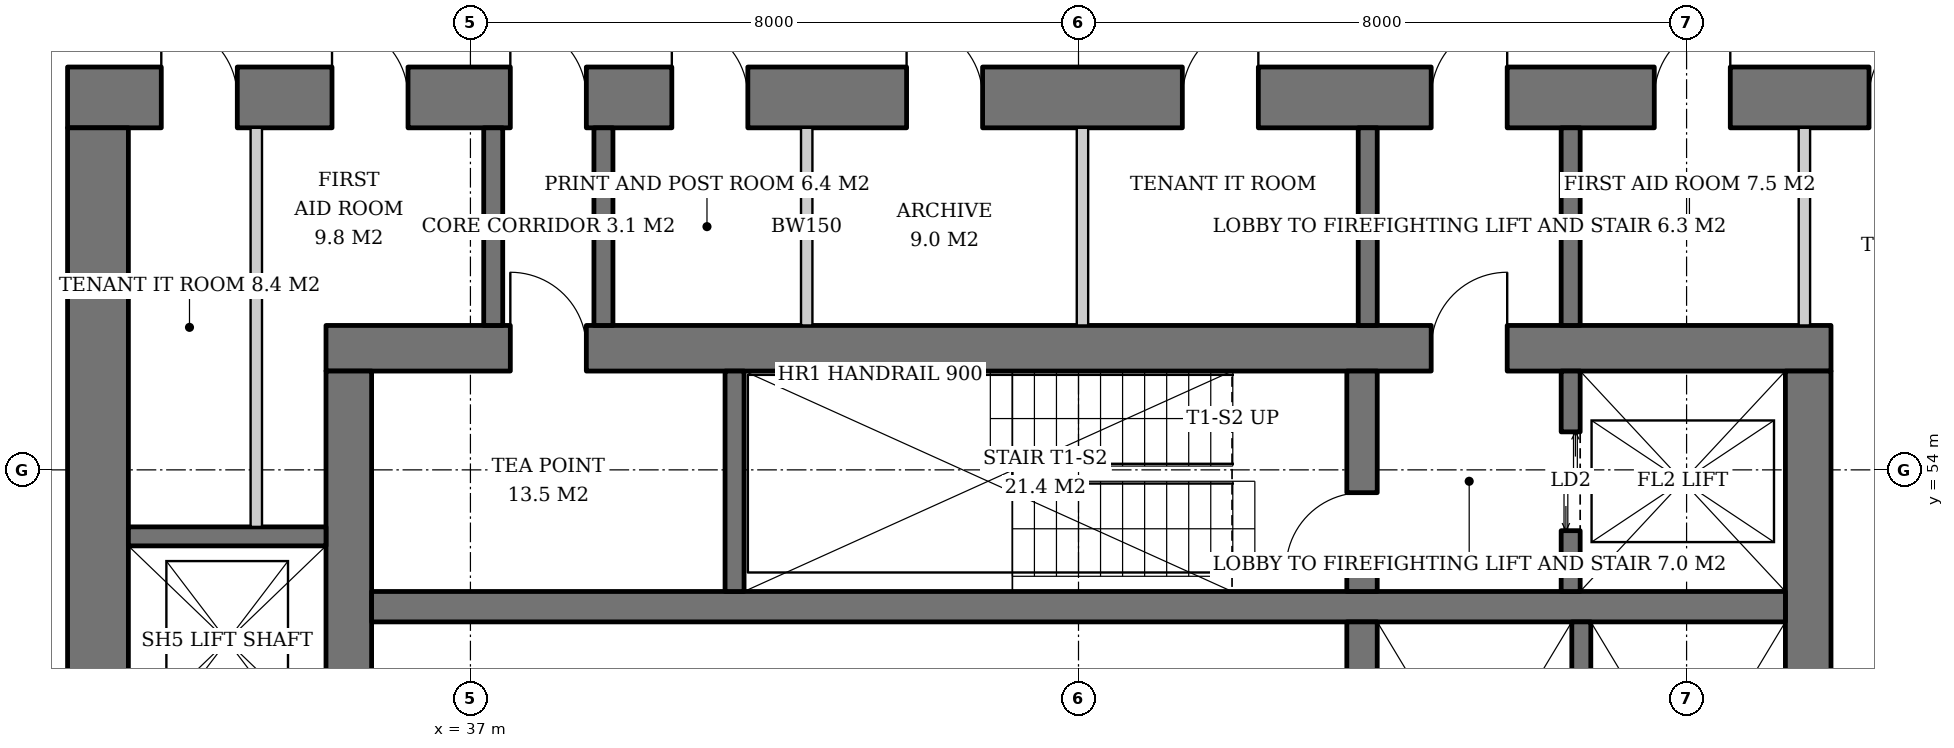
"""IFC4 building model, lengths in metres.
Left out: names, types, materials, properties, quantities, classifications, styles, units other than length and angle.
Written with IfcOpenShell. Run it as: python <this file> out.ifc"""

import sys

from ifc_helpers import new_model, si_unit, direction, frame, frame_2d, origin, place, context, subcontext, project, spatial, rectangle, extrude, element, fill, save


model = new_model("IFC4")
c1 = context("Model", 3, precision=1e-05, world=origin(), true_north=direction((0.0, 1.0)))
c2 = subcontext(c1, "Body", "Model", "MODEL_VIEW")
j1 = project(units=[si_unit("LENGTHUNIT", "METRE"), si_unit("PLANEANGLEUNIT", "RADIAN")], contexts=[c1])
p1 = place(None, origin())
s1 = spatial("IfcSite", under=j1, at=p1, CompositionType="ELEMENT")
p2 = place(p1, origin())
s2 = spatial("IfcBuilding", under=s1, at=p2, CompositionType="ELEMENT")
p3 = place(p2, frame((0.0, 0.0, 66.6)))
s3 = spatial("IfcBuildingStorey", under=s2, at=p3, CompositionType="ELEMENT", Elevation=66.6)
p4 = place(p3, frame((35.1, 55.6, 0.0), z_axis=(0.0, 0.0, 1.0), x_axis=(1.0, 0.0, 0.0)))
e1 = element("IfcWall", 1, at=p4, inside=s3, PredefinedType="SHEAR", context=c2, shape_type="SweptSolid", body=[
    extrude(rectangle(XDim=19.8, YDim=0.6, at=frame_2d((9.9, 0.0))), origin(), (0.0, 0.0, 1.0), 3.8),
])
p5 = place(p4, frame((14.54, 0.0, 0.0)))
e2 = element("IfcOpeningElement", 2, at=p5, cuts=e1, PredefinedType="OPENING", context=c2, shape_type="SweptSolid", body=[
    extrude(rectangle(XDim=1.0, YDim=2.1, at=frame_2d((0.5, 1.05))), frame((0.0, 0.31, 0.0), z_axis=(0.0, -1.0, 0.0), x_axis=(1.0, 0.0, 0.0)), (0.0, 0.0, 1.0), 0.62),
])
p6 = place(p4, frame((2.425, 0.0, 0.0)))
e3 = element("IfcOpeningElement", 3, at=p6, cuts=e1, PredefinedType="OPENING", context=c2, shape_type="SweptSolid", body=[
    extrude(rectangle(XDim=1.0, YDim=2.1, at=frame_2d((0.5, 1.05))), frame((0.0, 0.31, 0.0), z_axis=(0.0, -1.0, 0.0), x_axis=(1.0, 0.0, 0.0)), (0.0, 0.0, 1.0), 0.62),
])
p7 = place(p3, frame((35.4, 36.7, 0.0), z_axis=(0.0, 0.0, 1.0), x_axis=(0.0, 1.0, 0.0)))
e4 = element("IfcWall", 4, at=p7, inside=s3, PredefinedType="SHEAR", context=c2, shape_type="SweptSolid", body=[
    extrude(rectangle(XDim=18.6, YDim=0.6, at=frame_2d((9.3, 0.0))), origin(), (0.0, 0.0, 1.0), 3.8),
])
p8 = place(p7, frame((8.4, 0.0, 0.0)))
e5 = element("IfcOpeningElement", 5, at=p8, cuts=e4, PredefinedType="OPENING", context=c2, shape_type="SweptSolid", body=[
    extrude(rectangle(XDim=1.8, YDim=2.4, at=frame_2d((0.9, 1.2))), frame((0.0, 0.31, 0.0), z_axis=(0.0, -1.0, 0.0), x_axis=(1.0, 0.0, 0.0)), (0.0, 0.0, 1.0), 0.62),
])
p9 = place(p3, frame((54.6, 36.7, 0.0), z_axis=(0.0, 0.0, 1.0), x_axis=(0.0, 1.0, 0.0)))
e6 = element("IfcWall", 6, at=p9, inside=s3, PredefinedType="SHEAR", context=c2, shape_type="SweptSolid", body=[
    extrude(rectangle(XDim=18.6, YDim=0.6, at=frame_2d((9.3, 0.0))), origin(), (0.0, 0.0, 1.0), 3.8),
])
p10 = place(p9, frame((8.4, 0.0, 0.0)))
e7 = element("IfcOpeningElement", 7, at=p10, cuts=e6, PredefinedType="OPENING", context=c2, shape_type="SweptSolid", body=[
    extrude(rectangle(XDim=1.8, YDim=2.4, at=frame_2d((0.9, 1.2))), frame((0.0, 0.31, 0.0), z_axis=(0.0, -1.0, 0.0), x_axis=(1.0, 0.0, 0.0)), (0.0, 0.0, 1.0), 0.62),
])
p11 = place(p3, frame((31.7, 58.9, 0.0), z_axis=(0.0, 0.0, 1.0), x_axis=(1.0, 0.0, 0.0)))
e8 = element("IfcWall", 8, at=p11, inside=s3, PredefinedType="SHEAR", context=c2, shape_type="SweptSolid", body=[
    extrude(rectangle(XDim=26.6, YDim=0.8, at=frame_2d((13.3, 0.0))), origin(), (0.0, 0.0, 1.0), 3.8),
])
p12 = place(p11, frame((17.94, 0.0, 0.0)))
e9 = element("IfcOpeningElement", 9, at=p12, cuts=e8, PredefinedType="OPENING", context=c2, shape_type="SweptSolid", body=[
    extrude(rectangle(XDim=1.0, YDim=2.1, at=frame_2d((0.5, 1.05))), frame((0.0, 0.41, 0.0), z_axis=(0.0, -1.0, 0.0), x_axis=(1.0, 0.0, 0.0)), (0.0, 0.0, 1.0), 0.82),
])
p13 = place(p11, frame((5.825, 0.0, 0.0)))
e10 = element("IfcOpeningElement", 10, at=p13, cuts=e8, PredefinedType="OPENING", context=c2, shape_type="SweptSolid", body=[
    extrude(rectangle(XDim=1.0, YDim=2.1, at=frame_2d((0.5, 1.05))), frame((0.0, 0.41, 0.0), z_axis=(0.0, -1.0, 0.0), x_axis=(1.0, 0.0, 0.0)), (0.0, 0.0, 1.0), 0.82),
])
p14 = place(p11, frame((1.233, 0.0, 0.0)))
e11 = element("IfcOpeningElement", 11, at=p14, cuts=e8, PredefinedType="OPENING", context=c2, shape_type="SweptSolid", body=[
    extrude(rectangle(XDim=1.0, YDim=2.1, at=frame_2d((0.5, 1.05))), frame((0.0, 0.41, 0.0), z_axis=(0.0, -1.0, 0.0), x_axis=(1.0, 0.0, 0.0)), (0.0, 0.0, 1.0), 0.82),
])
p15 = place(p11, frame((3.479, 0.0, 0.0)))
e12 = element("IfcOpeningElement", 12, at=p15, cuts=e8, PredefinedType="OPENING", context=c2, shape_type="SweptSolid", body=[
    extrude(rectangle(XDim=1.0, YDim=2.1, at=frame_2d((0.5, 1.05))), frame((0.0, 0.41, 0.0), z_axis=(0.0, -1.0, 0.0), x_axis=(1.0, 0.0, 0.0)), (0.0, 0.0, 1.0), 0.82),
])
p16 = place(p11, frame((7.95, 0.0, 0.0)))
e13 = element("IfcOpeningElement", 13, at=p16, cuts=e8, PredefinedType="OPENING", context=c2, shape_type="SweptSolid", body=[
    extrude(rectangle(XDim=1.0, YDim=2.1, at=frame_2d((0.5, 1.05))), frame((0.0, 0.41, 0.0), z_axis=(0.0, -1.0, 0.0), x_axis=(1.0, 0.0, 0.0)), (0.0, 0.0, 1.0), 0.82),
])
p17 = place(p11, frame((11.038, 0.0, 0.0)))
e14 = element("IfcOpeningElement", 14, at=p17, cuts=e8, PredefinedType="OPENING", context=c2, shape_type="SweptSolid", body=[
    extrude(rectangle(XDim=1.0, YDim=2.1, at=frame_2d((0.5, 1.05))), frame((0.0, 0.41, 0.0), z_axis=(0.0, -1.0, 0.0), x_axis=(1.0, 0.0, 0.0)), (0.0, 0.0, 1.0), 0.82),
])
p18 = place(p11, frame((14.666, 0.0, 0.0)))
e15 = element("IfcOpeningElement", 15, at=p18, cuts=e8, PredefinedType="OPENING", context=c2, shape_type="SweptSolid", body=[
    extrude(rectangle(XDim=1.0, YDim=2.1, at=frame_2d((0.5, 1.05))), frame((0.0, 0.41, 0.0), z_axis=(0.0, -1.0, 0.0), x_axis=(1.0, 0.0, 0.0)), (0.0, 0.0, 1.0), 0.82),
])
p19 = place(p11, frame((20.875, 0.0, 0.0)))
e16 = element("IfcOpeningElement", 16, at=p19, cuts=e8, PredefinedType="OPENING", context=c2, shape_type="SweptSolid", body=[
    extrude(rectangle(XDim=1.0, YDim=2.1, at=frame_2d((0.5, 1.05))), frame((0.0, 0.41, 0.0), z_axis=(0.0, -1.0, 0.0), x_axis=(1.0, 0.0, 0.0)), (0.0, 0.0, 1.0), 0.82),
])
p20 = place(p11, frame((23.7, 0.0, 0.0)))
e17 = element("IfcOpeningElement", 17, at=p20, cuts=e8, PredefinedType="OPENING", context=c2, shape_type="SweptSolid", body=[
    extrude(rectangle(XDim=1.0, YDim=2.1, at=frame_2d((0.5, 1.05))), frame((0.0, 0.41, 0.0), z_axis=(0.0, -1.0, 0.0), x_axis=(1.0, 0.0, 0.0)), (0.0, 0.0, 1.0), 0.82),
])
p21 = place(p3, frame((32.1, 33.5, 0.0), z_axis=(0.0, 0.0, 1.0), x_axis=(0.0, 1.0, 0.0)))
e18 = element("IfcWall", 18, at=p21, inside=s3, PredefinedType="SHEAR", context=c2, shape_type="SweptSolid", body=[
    extrude(rectangle(XDim=25.0, YDim=0.8, at=frame_2d((12.5, 0.0))), origin(), (0.0, 0.0, 1.0), 3.8),
])
p22 = place(p21, frame((11.6, 0.0, 0.0)))
e19 = element("IfcOpeningElement", 19, at=p22, cuts=e18, PredefinedType="OPENING", context=c2, shape_type="SweptSolid", body=[
    extrude(rectangle(XDim=1.8, YDim=2.4, at=frame_2d((0.9, 1.2))), frame((0.0, 0.41, 0.0), z_axis=(0.0, -1.0, 0.0), x_axis=(1.0, 0.0, 0.0)), (0.0, 0.0, 1.0), 0.82),
])
p23 = place(p3, frame((35.7, 52.2, 0.0), z_axis=(0.0, 0.0, 1.0), x_axis=(1.0, 0.0, 0.0)))
e20 = element("IfcWall", 20, at=p23, inside=s3, PredefinedType="SHEAR", context=c2, shape_type="SweptSolid", body=[
    extrude(rectangle(XDim=18.6, YDim=0.4, at=frame_2d((9.3, 0.0))), origin(), (0.0, 0.0, 1.0), 3.8),
])
p24 = place(p3, frame((48.73, 40.0, 0.0), z_axis=(0.0, 0.0, 1.0), x_axis=(0.0, 1.0, 0.0)))
e21 = element("IfcWall", 21, at=p24, inside=s3, PredefinedType="SHEAR", context=c2, shape_type="SweptSolid", body=[
    extrude(rectangle(XDim=12.0, YDim=0.4, at=frame_2d((6.0, 0.0))), origin(), (0.0, 0.0, 1.0), 3.8),
])
p25 = place(p3, frame((48.73, 52.4, 0.0), z_axis=(0.0, 0.0, 1.0), x_axis=(0.0, 1.0, 0.0)))
e22 = element("IfcWall", 22, at=p25, inside=s3, PredefinedType="SHEAR", context=c2, shape_type="SweptSolid", body=[
    extrude(rectangle(XDim=2.9, YDim=0.4, at=frame_2d((1.45, 0.0))), origin(), (0.0, 0.0, 1.0), 3.8),
])
p26 = place(p25, frame((0.3, 0.0, 0.0)))
e23 = element("IfcOpeningElement", 23, at=p26, cuts=e22, PredefinedType="OPENING", context=c2, shape_type="SweptSolid", body=[
    extrude(rectangle(XDim=1.0, YDim=2.1, at=frame_2d((0.5, 1.05))), frame((0.0, 0.21, 0.0), z_axis=(0.0, -1.0, 0.0), x_axis=(1.0, 0.0, 0.0)), (0.0, 0.0, 1.0), 0.42),
])
p27 = place(p3, frame((40.475, 52.4, 0.0), z_axis=(0.0, 0.0, 1.0), x_axis=(0.0, 1.0, 0.0)))
e24 = element("IfcWall", 24, at=p27, inside=s3, PredefinedType="SHEAR", context=c2, shape_type="SweptSolid", body=[
    extrude(rectangle(XDim=2.9, YDim=0.25, at=frame_2d((1.45, 0.0))), origin(), (0.0, 0.0, 1.0), 3.8),
])
p28 = place(p3, frame((51.475, 52.4, 0.0), z_axis=(0.0, 0.0, 1.0), x_axis=(0.0, 1.0, 0.0)))
e25 = element("IfcWall", 25, at=p28, inside=s3, PredefinedType="SHEAR", context=c2, shape_type="SweptSolid", body=[
    extrude(rectangle(XDim=2.9, YDim=0.25, at=frame_2d((1.45, 0.0))), origin(), (0.0, 0.0, 1.0), 3.8),
])
p29 = place(p28, frame((0.8, 0.0, 0.0)))
e26 = element("IfcOpeningElement", 26, at=p29, cuts=e25, PredefinedType="OPENING", context=c2, shape_type="SweptSolid", body=[
    extrude(rectangle(XDim=1.3, YDim=2.2, at=frame_2d((0.65, 1.1))), frame((0.0, 0.135, 0.0), z_axis=(0.0, -1.0, 0.0), x_axis=(1.0, 0.0, 0.0)), (0.0, 0.0, 1.0), 0.27),
])
p30 = place(p3, frame((51.615, 47.75, 0.0), z_axis=(0.0, 0.0, 1.0), x_axis=(0.0, 1.0, 0.0)))
e27 = element("IfcWall", 27, at=p30, inside=s3, PredefinedType="SHEAR", context=c2, shape_type="SweptSolid", body=[
    extrude(rectangle(XDim=4.25, YDim=0.25, at=frame_2d((2.125, 0.0))), origin(), (0.0, 0.0, 1.0), 3.8),
])
p31 = place(p3, frame((32.5, 53.125, 0.0), z_axis=(0.0, 0.0, 1.0), x_axis=(1.0, 0.0, 0.0)))
e28 = element("IfcWall", 28, at=p31, inside=s3, PredefinedType="SHEAR", context=c2, shape_type="SweptSolid", body=[
    extrude(rectangle(XDim=2.6, YDim=0.25, at=frame_2d((1.3, 0.0))), origin(), (0.0, 0.0, 1.0), 3.8),
])
for number, where, z_axis, x_axis in (
    (29, (48.805, 55.9, 0.0), (0.0, 0.0, 1.0), (0.0, 1.0, 0.0)),
    (30, (51.475, 55.9, 0.0), (0.0, 0.0, 1.0), (0.0, 1.0, 0.0)),
    (31, (37.3, 55.9, 0.0), (0.0, 0.0, 1.0), (0.0, 1.0, 0.0)),
    (32, (38.75, 55.9, 0.0), (0.0, 0.0, 1.0), (0.0, 1.0, 0.0)),
):
    element("IfcWall", number, at=place(p3, frame(where, z_axis=z_axis, x_axis=x_axis)), inside=s3, PredefinedType="SOLIDWALL", context=c2, shape_type="SweptSolid", body=[
        extrude(rectangle(XDim=2.6, YDim=0.25, at=frame_2d((1.3, 0.0))), origin(), (0.0, 0.0, 1.0), 3.62),
    ])
p32 = place(p3, frame((34.183, 53.25, 0.0), z_axis=(0.0, 0.0, 1.0), x_axis=(0.0, 1.0, 0.0)))
e33 = element("IfcWall", 33, at=p32, inside=s3, PredefinedType="SOLIDWALL", context=c2, shape_type="SweptSolid", body=[
    extrude(rectangle(XDim=5.25, YDim=0.15, at=frame_2d((2.625, 0.0))), origin(), (0.0, 0.0, 1.0), 3.62),
])
for number, where, z_axis, x_axis in (
    (34, (41.424, 55.9, 0.0), (0.0, 0.0, 1.0), (0.0, 1.0, 0.0)),
    (35, (45.052, 55.9, 0.0), (0.0, 0.0, 1.0), (0.0, 1.0, 0.0)),
    (36, (54.55, 55.9, 0.0), (0.0, 0.0, 1.0), (0.0, 1.0, 0.0)),
):
    element("IfcWall", number, at=place(p3, frame(where, z_axis=z_axis, x_axis=x_axis)), inside=s3, PredefinedType="SOLIDWALL", context=c2, shape_type="SweptSolid", body=[
        extrude(rectangle(XDim=2.6, YDim=0.15, at=frame_2d((1.3, 0.0))), origin(), (0.0, 0.0, 1.0), 3.62),
    ])
p33 = place(p29, origin())
e37 = element("IfcDoor", 37, at=p33, inside=s3, OperationType="DOUBLE_DOOR_SLIDING", PredefinedType="DOOR", context=c2, shape_type="SweptSolid", body=[
    extrude(rectangle(XDim=1.3, YDim=2.2, at=frame_2d((0.65, 1.1))), frame((0.0, 0.025, 0.0), z_axis=(0.0, -1.0, 0.0), x_axis=(1.0, 0.0, 0.0)), (0.0, 0.0, 1.0), 0.05),
])
fill(e26, e37)
p34 = place(p26, origin())
e38 = element("IfcDoor", 38, at=p34, inside=s3, OperationType="SINGLE_SWING_LEFT", PredefinedType="DOOR", context=c2, shape_type="SweptSolid", body=[
    extrude(rectangle(XDim=1.0, YDim=2.1, at=frame_2d((0.5, 1.05))), frame((0.0, 0.025, 0.0), z_axis=(0.0, -1.0, 0.0), x_axis=(1.0, 0.0, 0.0)), (0.0, 0.0, 1.0), 0.05),
])
fill(e23, e38)
p35 = place(p5, origin())
e39 = element("IfcDoor", 39, at=p35, inside=s3, OperationType="SINGLE_SWING_RIGHT", PredefinedType="DOOR", context=c2, shape_type="SweptSolid", body=[
    extrude(rectangle(XDim=1.0, YDim=2.1, at=frame_2d((0.5, 1.05))), frame((0.0, 0.025, 0.0), z_axis=(0.0, -1.0, 0.0), x_axis=(1.0, 0.0, 0.0)), (0.0, 0.0, 1.0), 0.05),
])
fill(e2, e39)
p36 = place(p12, origin())
e40 = element("IfcDoor", 40, at=p36, inside=s3, OperationType="SINGLE_SWING_RIGHT", PredefinedType="DOOR", context=c2, shape_type="SweptSolid", body=[
    extrude(rectangle(XDim=1.0, YDim=2.1, at=frame_2d((0.5, 1.05))), frame((0.0, 0.025, 0.0), z_axis=(0.0, -1.0, 0.0), x_axis=(1.0, 0.0, 0.0)), (0.0, 0.0, 1.0), 0.05),
])
fill(e9, e40)
p37 = place(p13, origin())
e41 = element("IfcDoor", 41, at=p37, inside=s3, OperationType="SINGLE_SWING_LEFT", PredefinedType="DOOR", context=c2, shape_type="SweptSolid", body=[
    extrude(rectangle(XDim=1.0, YDim=2.1, at=frame_2d((0.5, 1.05))), frame((0.0, 0.025, 0.0), z_axis=(0.0, -1.0, 0.0), x_axis=(1.0, 0.0, 0.0)), (0.0, 0.0, 1.0), 0.05),
])
fill(e10, e41)
p38 = place(p6, origin())
e42 = element("IfcDoor", 42, at=p38, inside=s3, OperationType="SINGLE_SWING_LEFT", PredefinedType="DOOR", context=c2, shape_type="SweptSolid", body=[
    extrude(rectangle(XDim=1.0, YDim=2.1, at=frame_2d((0.5, 1.05))), frame((0.0, -0.24, 0.0), z_axis=(0.0, -1.0, 0.0), x_axis=(1.0, 0.0, 0.0)), (0.0, 0.0, 1.0), 0.05),
])
fill(e3, e42)
p39 = place(p14, origin())
e43 = element("IfcDoor", 43, at=p39, inside=s3, OperationType="SINGLE_SWING_LEFT", PredefinedType="DOOR", context=c2, shape_type="SweptSolid", body=[
    extrude(rectangle(XDim=1.0, YDim=2.1, at=frame_2d((0.5, 1.05))), frame((0.0, -0.34, 0.0), z_axis=(0.0, -1.0, 0.0), x_axis=(1.0, 0.0, 0.0)), (0.0, 0.0, 1.0), 0.05),
])
fill(e11, e43)
p40 = place(p15, origin())
e44 = element("IfcDoor", 44, at=p40, inside=s3, OperationType="SINGLE_SWING_LEFT", PredefinedType="DOOR", context=c2, shape_type="SweptSolid", body=[
    extrude(rectangle(XDim=1.0, YDim=2.1, at=frame_2d((0.5, 1.05))), frame((0.0, -0.34, 0.0), z_axis=(0.0, -1.0, 0.0), x_axis=(1.0, 0.0, 0.0)), (0.0, 0.0, 1.0), 0.05),
])
fill(e12, e44)
p41 = place(p16, origin())
e45 = element("IfcDoor", 45, at=p41, inside=s3, OperationType="SINGLE_SWING_LEFT", PredefinedType="DOOR", context=c2, shape_type="SweptSolid", body=[
    extrude(rectangle(XDim=1.0, YDim=2.1, at=frame_2d((0.5, 1.05))), frame((0.0, -0.34, 0.0), z_axis=(0.0, -1.0, 0.0), x_axis=(1.0, 0.0, 0.0)), (0.0, 0.0, 1.0), 0.05),
])
fill(e13, e45)
p42 = place(p17, origin())
e46 = element("IfcDoor", 46, at=p42, inside=s3, OperationType="SINGLE_SWING_LEFT", PredefinedType="DOOR", context=c2, shape_type="SweptSolid", body=[
    extrude(rectangle(XDim=1.0, YDim=2.1, at=frame_2d((0.5, 1.05))), frame((0.0, -0.34, 0.0), z_axis=(0.0, -1.0, 0.0), x_axis=(1.0, 0.0, 0.0)), (0.0, 0.0, 1.0), 0.05),
])
fill(e14, e46)
p43 = place(p18, origin())
e47 = element("IfcDoor", 47, at=p43, inside=s3, OperationType="SINGLE_SWING_RIGHT", PredefinedType="DOOR", context=c2, shape_type="SweptSolid", body=[
    extrude(rectangle(XDim=1.0, YDim=2.1, at=frame_2d((0.5, 1.05))), frame((0.0, -0.34, 0.0), z_axis=(0.0, -1.0, 0.0), x_axis=(1.0, 0.0, 0.0)), (0.0, 0.0, 1.0), 0.05),
])
fill(e15, e47)
p44 = place(p19, origin())
e48 = element("IfcDoor", 48, at=p44, inside=s3, OperationType="SINGLE_SWING_RIGHT", PredefinedType="DOOR", context=c2, shape_type="SweptSolid", body=[
    extrude(rectangle(XDim=1.0, YDim=2.1, at=frame_2d((0.5, 1.05))), frame((0.0, -0.34, 0.0), z_axis=(0.0, -1.0, 0.0), x_axis=(1.0, 0.0, 0.0)), (0.0, 0.0, 1.0), 0.05),
])
fill(e16, e48)
p45 = place(p20, origin())
e49 = element("IfcDoor", 49, at=p45, inside=s3, OperationType="SINGLE_SWING_RIGHT", PredefinedType="DOOR", context=c2, shape_type="SweptSolid", body=[
    extrude(rectangle(XDim=1.0, YDim=2.1, at=frame_2d((0.5, 1.05))), frame((0.0, -0.34, 0.0), z_axis=(0.0, -1.0, 0.0), x_axis=(1.0, 0.0, 0.0)), (0.0, 0.0, 1.0), 0.05),
])
fill(e17, e49)
save(model, sys.argv[1])
